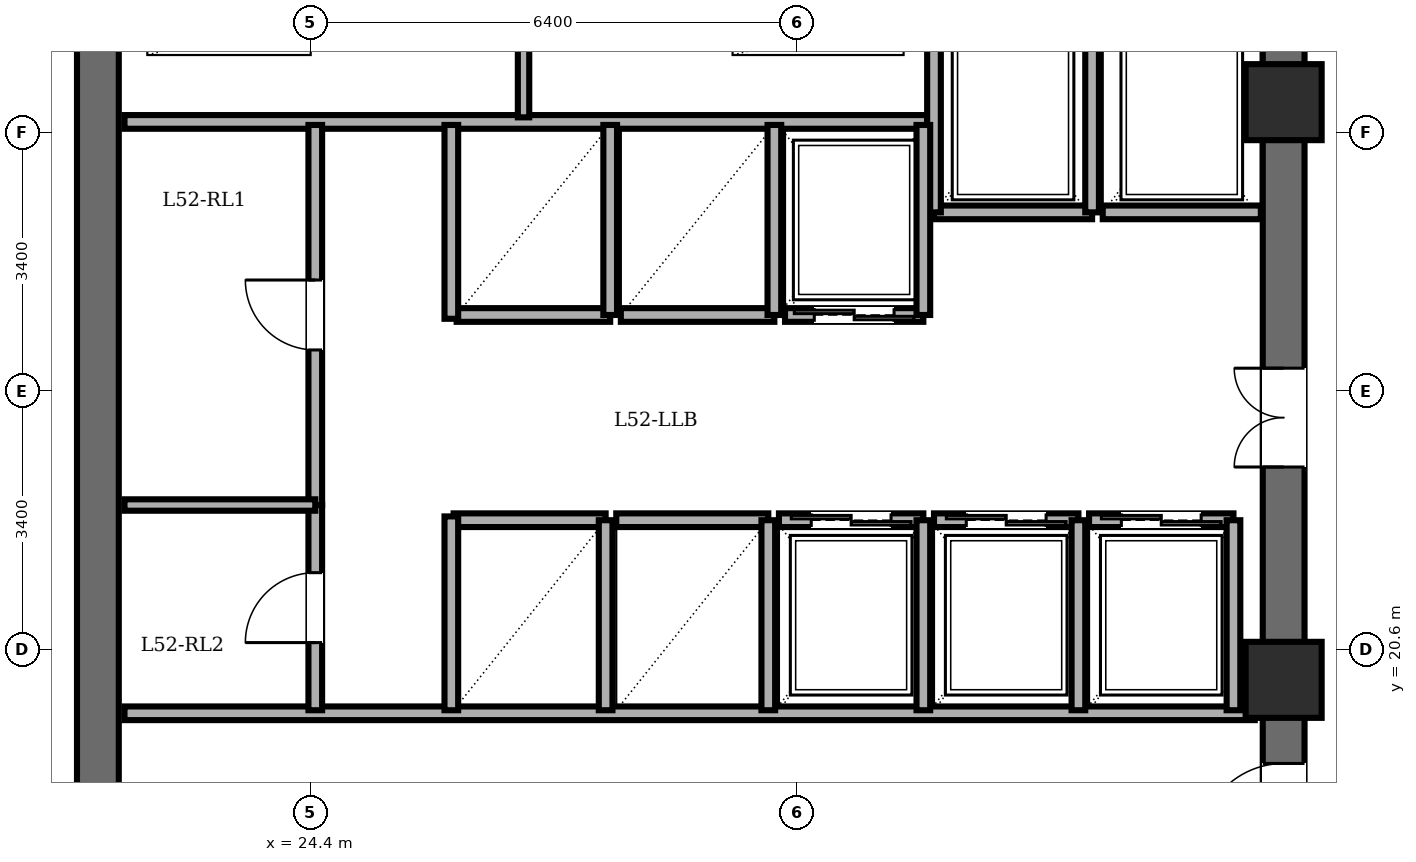
"""IFC4 building model, lengths in metres.
Left out: names, types, materials, properties, quantities, classifications, styles, units other than length and angle.
Written with IfcOpenShell. Run it as: python <this file> out.ifc"""

import sys

from ifc_helpers import new_model, si_unit, direction, frame, frame_2d, origin, origin_2d, place, context, subcontext, project, spatial, rectangle, extrude, element, fill, save


model = new_model("IFC4")
c1 = context("Model", 3, precision=1e-05, world=origin(), true_north=direction((0.0, 1.0)))
c2 = subcontext(c1, "Body", "Model", "MODEL_VIEW")
j1 = project(units=[si_unit("LENGTHUNIT", "METRE"), si_unit("PLANEANGLEUNIT", "RADIAN")], contexts=[c1])
p1 = place(None, origin())
s1 = spatial("IfcSite", under=j1, at=p1, CompositionType="ELEMENT")
p2 = place(p1, origin())
s2 = spatial("IfcBuilding", under=s1, at=p2, CompositionType="ELEMENT")
p3 = place(p2, frame((0.0, 0.0, 201.3)))
s3 = spatial("IfcBuildingStorey", under=s2, at=p3, CompositionType="ELEMENT", Elevation=201.3)
for number, where, z_axis, x_axis in (
    (1, (37.2, 20.2, 0.0), (0.0, 0.0, 1.0), (1.0, 0.0, 0.0)),
    (2, (37.2, 27.8, 0.0), (0.0, 0.0, 1.0), (1.0, 0.0, 0.0)),
):
    element("IfcColumn", number, at=place(p3, frame(where, z_axis=z_axis, x_axis=x_axis)), inside=s3, PredefinedType="COLUMN", context=c2, shape_type="SweptSolid", body=[
        extrude(rectangle(XDim=1.0, YDim=1.0, at=origin_2d()), origin(), (0.0, 0.0, 1.0), 3.6),
    ])
p4 = place(p3, frame((21.6, 14.4, 0.0), z_axis=(0.0, 0.0, 1.0), x_axis=(0.0, 1.0, 0.0)))
e3 = element("IfcWall", 3, at=p4, inside=s3, PredefinedType="SHEAR", context=c2, shape_type="SweptSolid", body=[
    extrude(rectangle(XDim=19.2, YDim=0.55, at=frame_2d((9.6, 0.0))), origin(), (0.0, 0.0, 1.0), 3.4),
])
p5 = place(p3, frame((37.2, 14.4, 0.0), z_axis=(0.0, 0.0, 1.0), x_axis=(0.0, 1.0, 0.0)))
e4 = element("IfcWall", 4, at=p5, inside=s3, PredefinedType="SHEAR", context=c2, shape_type="SweptSolid", body=[
    extrude(rectangle(XDim=19.2, YDim=0.55, at=frame_2d((9.6, 0.0))), origin(), (0.0, 0.0, 1.0), 3.4),
])
p6 = place(p5, frame((15.8, 0.0, 0.0)))
e5 = element("IfcOpeningElement", 5, at=p6, cuts=e4, PredefinedType="OPENING", context=c2, shape_type="SweptSolid", body=[
    extrude(rectangle(XDim=1.15, YDim=2.15, at=frame_2d((0.575, 1.075))), frame((0.0, 0.285, 0.0), z_axis=(0.0, -1.0, 0.0), x_axis=(1.0, 0.0, 0.0)), (0.0, 0.0, 1.0), 0.57),
])
p7 = place(p5, frame((3.6, 0.0, 0.0)))
e6 = element("IfcOpeningElement", 6, at=p7, cuts=e4, PredefinedType="OPENING", context=c2, shape_type="SweptSolid", body=[
    extrude(rectangle(XDim=1.1, YDim=2.15, at=frame_2d((0.55, 1.075))), frame((0.0, 0.285, 0.0), z_axis=(0.0, -1.0, 0.0), x_axis=(1.0, 0.0, 0.0)), (0.0, 0.0, 1.0), 0.57),
])
p8 = place(p5, frame((8.6, 0.0, 0.0)))
e7 = element("IfcOpeningElement", 7, at=p8, cuts=e4, PredefinedType="OPENING", context=c2, shape_type="SweptSolid", body=[
    extrude(rectangle(XDim=1.3, YDim=2.2, at=frame_2d((0.65, 1.1))), frame((0.0, 0.285, 0.0), z_axis=(0.0, -1.0, 0.0), x_axis=(1.0, 0.0, 0.0)), (0.0, 0.0, 1.0), 0.57),
])
p9 = place(p3, frame((21.95, 27.54, 0.0), z_axis=(0.0, 0.0, 1.0), x_axis=(1.0, 0.0, 0.0)))
e8 = element("IfcWall", 8, at=p9, inside=s3, PredefinedType="PARTITIONING", context=c2, shape_type="SweptSolid", body=[
    extrude(rectangle(XDim=10.56, YDim=0.18, at=frame_2d((5.28, 0.0))), origin(), (0.0, 0.0, 1.0), 3.4),
])
p10 = place(p3, frame((27.2, 27.6, 0.0), z_axis=(0.0, 0.0, 1.0), x_axis=(0.0, 1.0, 0.0)))
e9 = element("IfcWall", 9, at=p10, inside=s3, PredefinedType="PARTITIONING", context=c2, shape_type="SweptSolid", body=[
    extrude(rectangle(XDim=1.52, YDim=0.15, at=frame_2d((0.76, 0.0))), origin(), (0.0, 0.0, 1.0), 3.4),
])
p11 = place(p3, frame((21.95, 19.76, 0.0), z_axis=(0.0, 0.0, 1.0), x_axis=(1.0, 0.0, 0.0)))
e10 = element("IfcWall", 10, at=p11, inside=s3, PredefinedType="PARTITIONING", context=c2, shape_type="SweptSolid", body=[
    extrude(rectangle(XDim=14.87, YDim=0.18, at=frame_2d((7.435, 0.0))), origin(), (0.0, 0.0, 1.0), 3.4),
])
p12 = place(p3, frame((34.68, 26.35, 0.0), z_axis=(0.0, 0.0, 1.0), x_axis=(-1.0, 0.0, 0.0)))
e11 = element("IfcWall", 11, at=p12, inside=s3, PredefinedType="PARTITIONING", context=c2, shape_type="SweptSolid", body=[
    extrude(rectangle(XDim=2.08, YDim=0.18, at=frame_2d((1.04, 0.0))), origin(), (0.0, 0.0, 1.0), 3.4),
])
for number, where, z_axis, x_axis in (
    (12, (34.68, 26.35, 0.0), (0.0, 0.0, 1.0), (0.0, 1.0, 0.0)),
    (13, (32.6, 29.08, 0.0), (0.0, 0.0, 1.0), (0.0, -1.0, 0.0)),
):
    element("IfcWall", number, at=place(p3, frame(where, z_axis=z_axis, x_axis=x_axis)), inside=s3, PredefinedType="PARTITIONING", context=c2, shape_type="SweptSolid", body=[
        extrude(rectangle(XDim=2.73, YDim=0.18, at=frame_2d((1.365, 0.0))), origin(), (0.0, 0.0, 1.0), 3.4),
    ])
p13 = place(p3, frame((36.9, 26.35, 0.0), z_axis=(0.0, 0.0, 1.0), x_axis=(-1.0, 0.0, 0.0)))
e14 = element("IfcWall", 14, at=p13, inside=s3, PredefinedType="PARTITIONING", context=c2, shape_type="SweptSolid", body=[
    extrude(rectangle(XDim=2.08, YDim=0.18, at=frame_2d((1.04, 0.0))), origin(), (0.0, 0.0, 1.0), 3.4),
])
p14 = place(p3, frame((28.34, 25.0, 0.0), z_axis=(0.0, 0.0, 1.0), x_axis=(-1.0, 0.0, 0.0)))
e15 = element("IfcWall", 15, at=p14, inside=s3, PredefinedType="PARTITIONING", context=c2, shape_type="SweptSolid", body=[
    extrude(rectangle(XDim=2.02, YDim=0.18, at=frame_2d((1.01, 0.0))), origin(), (0.0, 0.0, 1.0), 3.4),
])
p15 = place(p3, frame((28.34, 25.0, 0.0), z_axis=(0.0, 0.0, 1.0), x_axis=(0.0, 1.0, 0.0)))
e16 = element("IfcWall", 16, at=p15, inside=s3, PredefinedType="PARTITIONING", context=c2, shape_type="SweptSolid", body=[
    extrude(rectangle(XDim=2.5, YDim=0.18, at=frame_2d((1.25, 0.0))), origin(), (0.0, 0.0, 1.0), 3.4),
])
p16 = place(p3, frame((30.5, 25.0, 0.0), z_axis=(0.0, 0.0, 1.0), x_axis=(-1.0, 0.0, 0.0)))
e17 = element("IfcWall", 17, at=p16, inside=s3, PredefinedType="PARTITIONING", context=c2, shape_type="SweptSolid", body=[
    extrude(rectangle(XDim=2.02, YDim=0.18, at=frame_2d((1.01, 0.0))), origin(), (0.0, 0.0, 1.0), 3.4),
])
p17 = place(p3, frame((30.5, 25.0, 0.0), z_axis=(0.0, 0.0, 1.0), x_axis=(0.0, 1.0, 0.0)))
e18 = element("IfcWall", 18, at=p17, inside=s3, PredefinedType="PARTITIONING", context=c2, shape_type="SweptSolid", body=[
    extrude(rectangle(XDim=2.5, YDim=0.18, at=frame_2d((1.25, 0.0))), origin(), (0.0, 0.0, 1.0), 3.4),
])
p18 = place(p3, frame((26.28, 22.3, 0.0), z_axis=(0.0, 0.0, 1.0), x_axis=(1.0, 0.0, 0.0)))
e19 = element("IfcWall", 19, at=p18, inside=s3, PredefinedType="PARTITIONING", context=c2, shape_type="SweptSolid", body=[
    extrude(rectangle(XDim=2.0, YDim=0.18, at=frame_2d((1.0, 0.0))), origin(), (0.0, 0.0, 1.0), 3.4),
])
p19 = place(p3, frame((28.28, 19.8, 0.0), z_axis=(0.0, 0.0, 1.0), x_axis=(0.0, 1.0, 0.0)))
e20 = element("IfcWall", 20, at=p19, inside=s3, PredefinedType="PARTITIONING", context=c2, shape_type="SweptSolid", body=[
    extrude(rectangle(XDim=2.5, YDim=0.18, at=frame_2d((1.25, 0.0))), origin(), (0.0, 0.0, 1.0), 3.4),
])
p20 = place(p3, frame((28.42, 22.3, 0.0), z_axis=(0.0, 0.0, 1.0), x_axis=(1.0, 0.0, 0.0)))
e21 = element("IfcWall", 21, at=p20, inside=s3, PredefinedType="PARTITIONING", context=c2, shape_type="SweptSolid", body=[
    extrude(rectangle(XDim=2.0, YDim=0.18, at=frame_2d((1.0, 0.0))), origin(), (0.0, 0.0, 1.0), 3.4),
])
p21 = place(p3, frame((30.42, 19.8, 0.0), z_axis=(0.0, 0.0, 1.0), x_axis=(0.0, 1.0, 0.0)))
e22 = element("IfcWall", 22, at=p21, inside=s3, PredefinedType="PARTITIONING", context=c2, shape_type="SweptSolid", body=[
    extrude(rectangle(XDim=2.5, YDim=0.18, at=frame_2d((1.25, 0.0))), origin(), (0.0, 0.0, 1.0), 3.4),
])
p22 = place(p3, frame((32.46, 25.0, 0.0), z_axis=(0.0, 0.0, 1.0), x_axis=(-1.0, 0.0, 0.0)))
e23 = element("IfcWall", 23, at=p22, inside=s3, PredefinedType="PARTITIONING", context=c2, shape_type="SweptSolid", body=[
    extrude(rectangle(XDim=1.82, YDim=0.18, at=frame_2d((0.91, 0.0))), origin(), (0.0, 0.0, 1.0), 3.4),
])
p23 = place(p22, frame((0.385, 0.0, 0.0)))
e24 = element("IfcOpeningElement", 24, at=p23, cuts=e23, PredefinedType="OPENING", context=c2, shape_type="SweptSolid", body=[
    extrude(rectangle(XDim=1.05, YDim=2.2, at=frame_2d((0.525, 1.1))), frame((0.0, 0.1, 0.0), z_axis=(0.0, -1.0, 0.0), x_axis=(1.0, 0.0, 0.0)), (0.0, 0.0, 1.0), 0.2),
])
p24 = place(p3, frame((32.46, 25.0, 0.0), z_axis=(0.0, 0.0, 1.0), x_axis=(0.0, 1.0, 0.0)))
e25 = element("IfcWall", 25, at=p24, inside=s3, PredefinedType="PARTITIONING", context=c2, shape_type="SweptSolid", body=[
    extrude(rectangle(XDim=2.5, YDim=0.18, at=frame_2d((1.25, 0.0))), origin(), (0.0, 0.0, 1.0), 3.4),
])
p25 = place(p3, frame((30.56, 22.3, 0.0), z_axis=(0.0, 0.0, 1.0), x_axis=(1.0, 0.0, 0.0)))
e26 = element("IfcWall", 26, at=p25, inside=s3, PredefinedType="PARTITIONING", context=c2, shape_type="SweptSolid", body=[
    extrude(rectangle(XDim=1.9, YDim=0.18, at=frame_2d((0.95, 0.0))), origin(), (0.0, 0.0, 1.0), 3.4),
])
p26 = place(p25, frame((0.425, 0.0, 0.0)))
e27 = element("IfcOpeningElement", 27, at=p26, cuts=e26, PredefinedType="OPENING", context=c2, shape_type="SweptSolid", body=[
    extrude(rectangle(XDim=1.05, YDim=2.2, at=frame_2d((0.525, 1.1))), frame((0.0, 0.1, 0.0), z_axis=(0.0, -1.0, 0.0), x_axis=(1.0, 0.0, 0.0)), (0.0, 0.0, 1.0), 0.2),
])
p27 = place(p3, frame((32.46, 19.8, 0.0), z_axis=(0.0, 0.0, 1.0), x_axis=(0.0, 1.0, 0.0)))
e28 = element("IfcWall", 28, at=p27, inside=s3, PredefinedType="PARTITIONING", context=c2, shape_type="SweptSolid", body=[
    extrude(rectangle(XDim=2.5, YDim=0.18, at=frame_2d((1.25, 0.0))), origin(), (0.0, 0.0, 1.0), 3.4),
])
p28 = place(p3, frame((32.6, 22.3, 0.0), z_axis=(0.0, 0.0, 1.0), x_axis=(1.0, 0.0, 0.0)))
e29 = element("IfcWall", 29, at=p28, inside=s3, PredefinedType="PARTITIONING", context=c2, shape_type="SweptSolid", body=[
    extrude(rectangle(XDim=1.9, YDim=0.18, at=frame_2d((0.95, 0.0))), origin(), (0.0, 0.0, 1.0), 3.4),
])
p29 = place(p28, frame((0.425, 0.0, 0.0)))
e30 = element("IfcOpeningElement", 30, at=p29, cuts=e29, PredefinedType="OPENING", context=c2, shape_type="SweptSolid", body=[
    extrude(rectangle(XDim=1.05, YDim=2.2, at=frame_2d((0.525, 1.1))), frame((0.0, 0.1, 0.0), z_axis=(0.0, -1.0, 0.0), x_axis=(1.0, 0.0, 0.0)), (0.0, 0.0, 1.0), 0.2),
])
p30 = place(p3, frame((34.5, 19.8, 0.0), z_axis=(0.0, 0.0, 1.0), x_axis=(0.0, 1.0, 0.0)))
e31 = element("IfcWall", 31, at=p30, inside=s3, PredefinedType="PARTITIONING", context=c2, shape_type="SweptSolid", body=[
    extrude(rectangle(XDim=2.5, YDim=0.18, at=frame_2d((1.25, 0.0))), origin(), (0.0, 0.0, 1.0), 3.4),
])
p31 = place(p3, frame((34.64, 22.3, 0.0), z_axis=(0.0, 0.0, 1.0), x_axis=(1.0, 0.0, 0.0)))
e32 = element("IfcWall", 32, at=p31, inside=s3, PredefinedType="PARTITIONING", context=c2, shape_type="SweptSolid", body=[
    extrude(rectangle(XDim=1.9, YDim=0.18, at=frame_2d((0.95, 0.0))), origin(), (0.0, 0.0, 1.0), 3.4),
])
p32 = place(p31, frame((0.425, 0.0, 0.0)))
e33 = element("IfcOpeningElement", 33, at=p32, cuts=e32, PredefinedType="OPENING", context=c2, shape_type="SweptSolid", body=[
    extrude(rectangle(XDim=1.05, YDim=2.2, at=frame_2d((0.525, 1.1))), frame((0.0, 0.1, 0.0), z_axis=(0.0, -1.0, 0.0), x_axis=(1.0, 0.0, 0.0)), (0.0, 0.0, 1.0), 0.2),
])
p33 = place(p3, frame((36.54, 19.8, 0.0), z_axis=(0.0, 0.0, 1.0), x_axis=(0.0, 1.0, 0.0)))
e34 = element("IfcWall", 34, at=p33, inside=s3, PredefinedType="PARTITIONING", context=c2, shape_type="SweptSolid", body=[
    extrude(rectangle(XDim=2.5, YDim=0.18, at=frame_2d((1.25, 0.0))), origin(), (0.0, 0.0, 1.0), 3.4),
])
p34 = place(p3, frame((24.46, 22.5, 0.0), z_axis=(0.0, 0.0, 1.0), x_axis=(0.0, 1.0, 0.0)))
e35 = element("IfcWall", 35, at=p34, inside=s3, PredefinedType="PARTITIONING", context=c2, shape_type="SweptSolid", body=[
    extrude(rectangle(XDim=5.0, YDim=0.18, at=frame_2d((2.5, 0.0))), origin(), (0.0, 0.0, 1.0), 3.4),
])
p35 = place(p34, frame((2.04, 0.0, 0.0)))
e36 = element("IfcOpeningElement", 36, at=p35, cuts=e35, PredefinedType="OPENING", context=c2, shape_type="SweptSolid", body=[
    extrude(rectangle(XDim=0.92, YDim=2.1, at=frame_2d((0.46, 1.05))), frame((0.0, 0.1, 0.0), z_axis=(0.0, -1.0, 0.0), x_axis=(1.0, 0.0, 0.0)), (0.0, 0.0, 1.0), 0.2),
])
p36 = place(p3, frame((24.46, 19.8, 0.0), z_axis=(0.0, 0.0, 1.0), x_axis=(0.0, 1.0, 0.0)))
e37 = element("IfcWall", 37, at=p36, inside=s3, PredefinedType="PARTITIONING", context=c2, shape_type="SweptSolid", body=[
    extrude(rectangle(XDim=2.7, YDim=0.18, at=frame_2d((1.35, 0.0))), origin(), (0.0, 0.0, 1.0), 3.4),
])
p37 = place(p36, frame((0.89, 0.0, 0.0)))
e38 = element("IfcOpeningElement", 38, at=p37, cuts=e37, PredefinedType="OPENING", context=c2, shape_type="SweptSolid", body=[
    extrude(rectangle(XDim=0.92, YDim=2.1, at=frame_2d((0.46, 1.05))), frame((0.0, 0.1, 0.0), z_axis=(0.0, -1.0, 0.0), x_axis=(1.0, 0.0, 0.0)), (0.0, 0.0, 1.0), 0.2),
])
p38 = place(p3, frame((21.95, 22.5, 0.0), z_axis=(0.0, 0.0, 1.0), x_axis=(1.0, 0.0, 0.0)))
e39 = element("IfcWall", 39, at=p38, inside=s3, PredefinedType="PARTITIONING", context=c2, shape_type="SweptSolid", body=[
    extrude(rectangle(XDim=2.51, YDim=0.15, at=frame_2d((1.255, 0.0))), origin(), (0.0, 0.0, 1.0), 3.4),
])
for number, where, z_axis, x_axis in (
    (40, (26.25, 24.95, 0.0), (0.0, 0.0, 1.0), (0.0, 1.0, 0.0)),
    (41, (26.25, 19.8, 0.0), (0.0, 0.0, 1.0), (0.0, 1.0, 0.0)),
):
    element("IfcWall", number, at=place(p3, frame(where, z_axis=z_axis, x_axis=x_axis)), inside=s3, PredefinedType="PARTITIONING", context=c2, shape_type="SweptSolid", body=[
        extrude(rectangle(XDim=2.55, YDim=0.18, at=frame_2d((1.275, 0.0))), origin(), (0.0, 0.0, 1.0), 3.4),
    ])
p39 = place(p7, origin())
e42 = element("IfcDoor", 42, at=p39, inside=s3, OperationType="SINGLE_SWING_LEFT", PredefinedType="DOOR", context=c2, shape_type="SweptSolid", body=[
    extrude(rectangle(XDim=1.1, YDim=2.15, at=frame_2d((0.55, 1.075))), frame((0.0, 0.025, 0.0), z_axis=(0.0, -1.0, 0.0), x_axis=(1.0, 0.0, 0.0)), (0.0, 0.0, 1.0), 0.05),
])
fill(e6, e42)
p40 = place(p23, origin())
e43 = element("IfcDoor", 43, at=p40, inside=s3, OperationType="DOUBLE_DOOR_SLIDING", PredefinedType="DOOR", context=c2, shape_type="SweptSolid", body=[
    extrude(rectangle(XDim=1.05, YDim=2.2, at=frame_2d((0.525, 1.1))), frame((0.0, 0.025, 0.0), z_axis=(0.0, -1.0, 0.0), x_axis=(1.0, 0.0, 0.0)), (0.0, 0.0, 1.0), 0.05),
])
fill(e24, e43)
p41 = place(p26, origin())
e44 = element("IfcDoor", 44, at=p41, inside=s3, OperationType="DOUBLE_DOOR_SLIDING", PredefinedType="DOOR", context=c2, shape_type="SweptSolid", body=[
    extrude(rectangle(XDim=1.05, YDim=2.2, at=frame_2d((0.525, 1.1))), frame((0.0, 0.025, 0.0), z_axis=(0.0, -1.0, 0.0), x_axis=(1.0, 0.0, 0.0)), (0.0, 0.0, 1.0), 0.05),
])
fill(e27, e44)
p42 = place(p29, origin())
e45 = element("IfcDoor", 45, at=p42, inside=s3, OperationType="DOUBLE_DOOR_SLIDING", PredefinedType="DOOR", context=c2, shape_type="SweptSolid", body=[
    extrude(rectangle(XDim=1.05, YDim=2.2, at=frame_2d((0.525, 1.1))), frame((0.0, 0.025, 0.0), z_axis=(0.0, -1.0, 0.0), x_axis=(1.0, 0.0, 0.0)), (0.0, 0.0, 1.0), 0.05),
])
fill(e30, e45)
p43 = place(p32, origin())
e46 = element("IfcDoor", 46, at=p43, inside=s3, OperationType="DOUBLE_DOOR_SLIDING", PredefinedType="DOOR", context=c2, shape_type="SweptSolid", body=[
    extrude(rectangle(XDim=1.05, YDim=2.2, at=frame_2d((0.525, 1.1))), frame((0.0, 0.025, 0.0), z_axis=(0.0, -1.0, 0.0), x_axis=(1.0, 0.0, 0.0)), (0.0, 0.0, 1.0), 0.05),
])
fill(e33, e46)
p44 = place(p35, origin())
e47 = element("IfcDoor", 47, at=p44, inside=s3, OperationType="SINGLE_SWING_RIGHT", PredefinedType="DOOR", context=c2, shape_type="SweptSolid", body=[
    extrude(rectangle(XDim=0.92, YDim=2.1, at=frame_2d((0.46, 1.05))), frame((0.0, 0.025, 0.0), z_axis=(0.0, -1.0, 0.0), x_axis=(1.0, 0.0, 0.0)), (0.0, 0.0, 1.0), 0.05),
])
fill(e36, e47)
p45 = place(p37, origin())
e48 = element("IfcDoor", 48, at=p45, inside=s3, OperationType="SINGLE_SWING_LEFT", PredefinedType="DOOR", context=c2, shape_type="SweptSolid", body=[
    extrude(rectangle(XDim=0.92, YDim=2.1, at=frame_2d((0.46, 1.05))), frame((0.0, 0.025, 0.0), z_axis=(0.0, -1.0, 0.0), x_axis=(1.0, 0.0, 0.0)), (0.0, 0.0, 1.0), 0.05),
])
fill(e38, e48)
p46 = place(p8, origin())
e49 = element("IfcDoor", 49, at=p46, inside=s3, OperationType="DOUBLE_DOOR_SINGLE_SWING", PredefinedType="DOOR", context=c2, shape_type="SweptSolid", body=[
    extrude(rectangle(XDim=1.3, YDim=2.2, at=frame_2d((0.65, 1.1))), frame((0.0, 0.025, 0.0), z_axis=(0.0, -1.0, 0.0), x_axis=(1.0, 0.0, 0.0)), (0.0, 0.0, 1.0), 0.05),
])
fill(e7, e49)
save(model, sys.argv[1])
